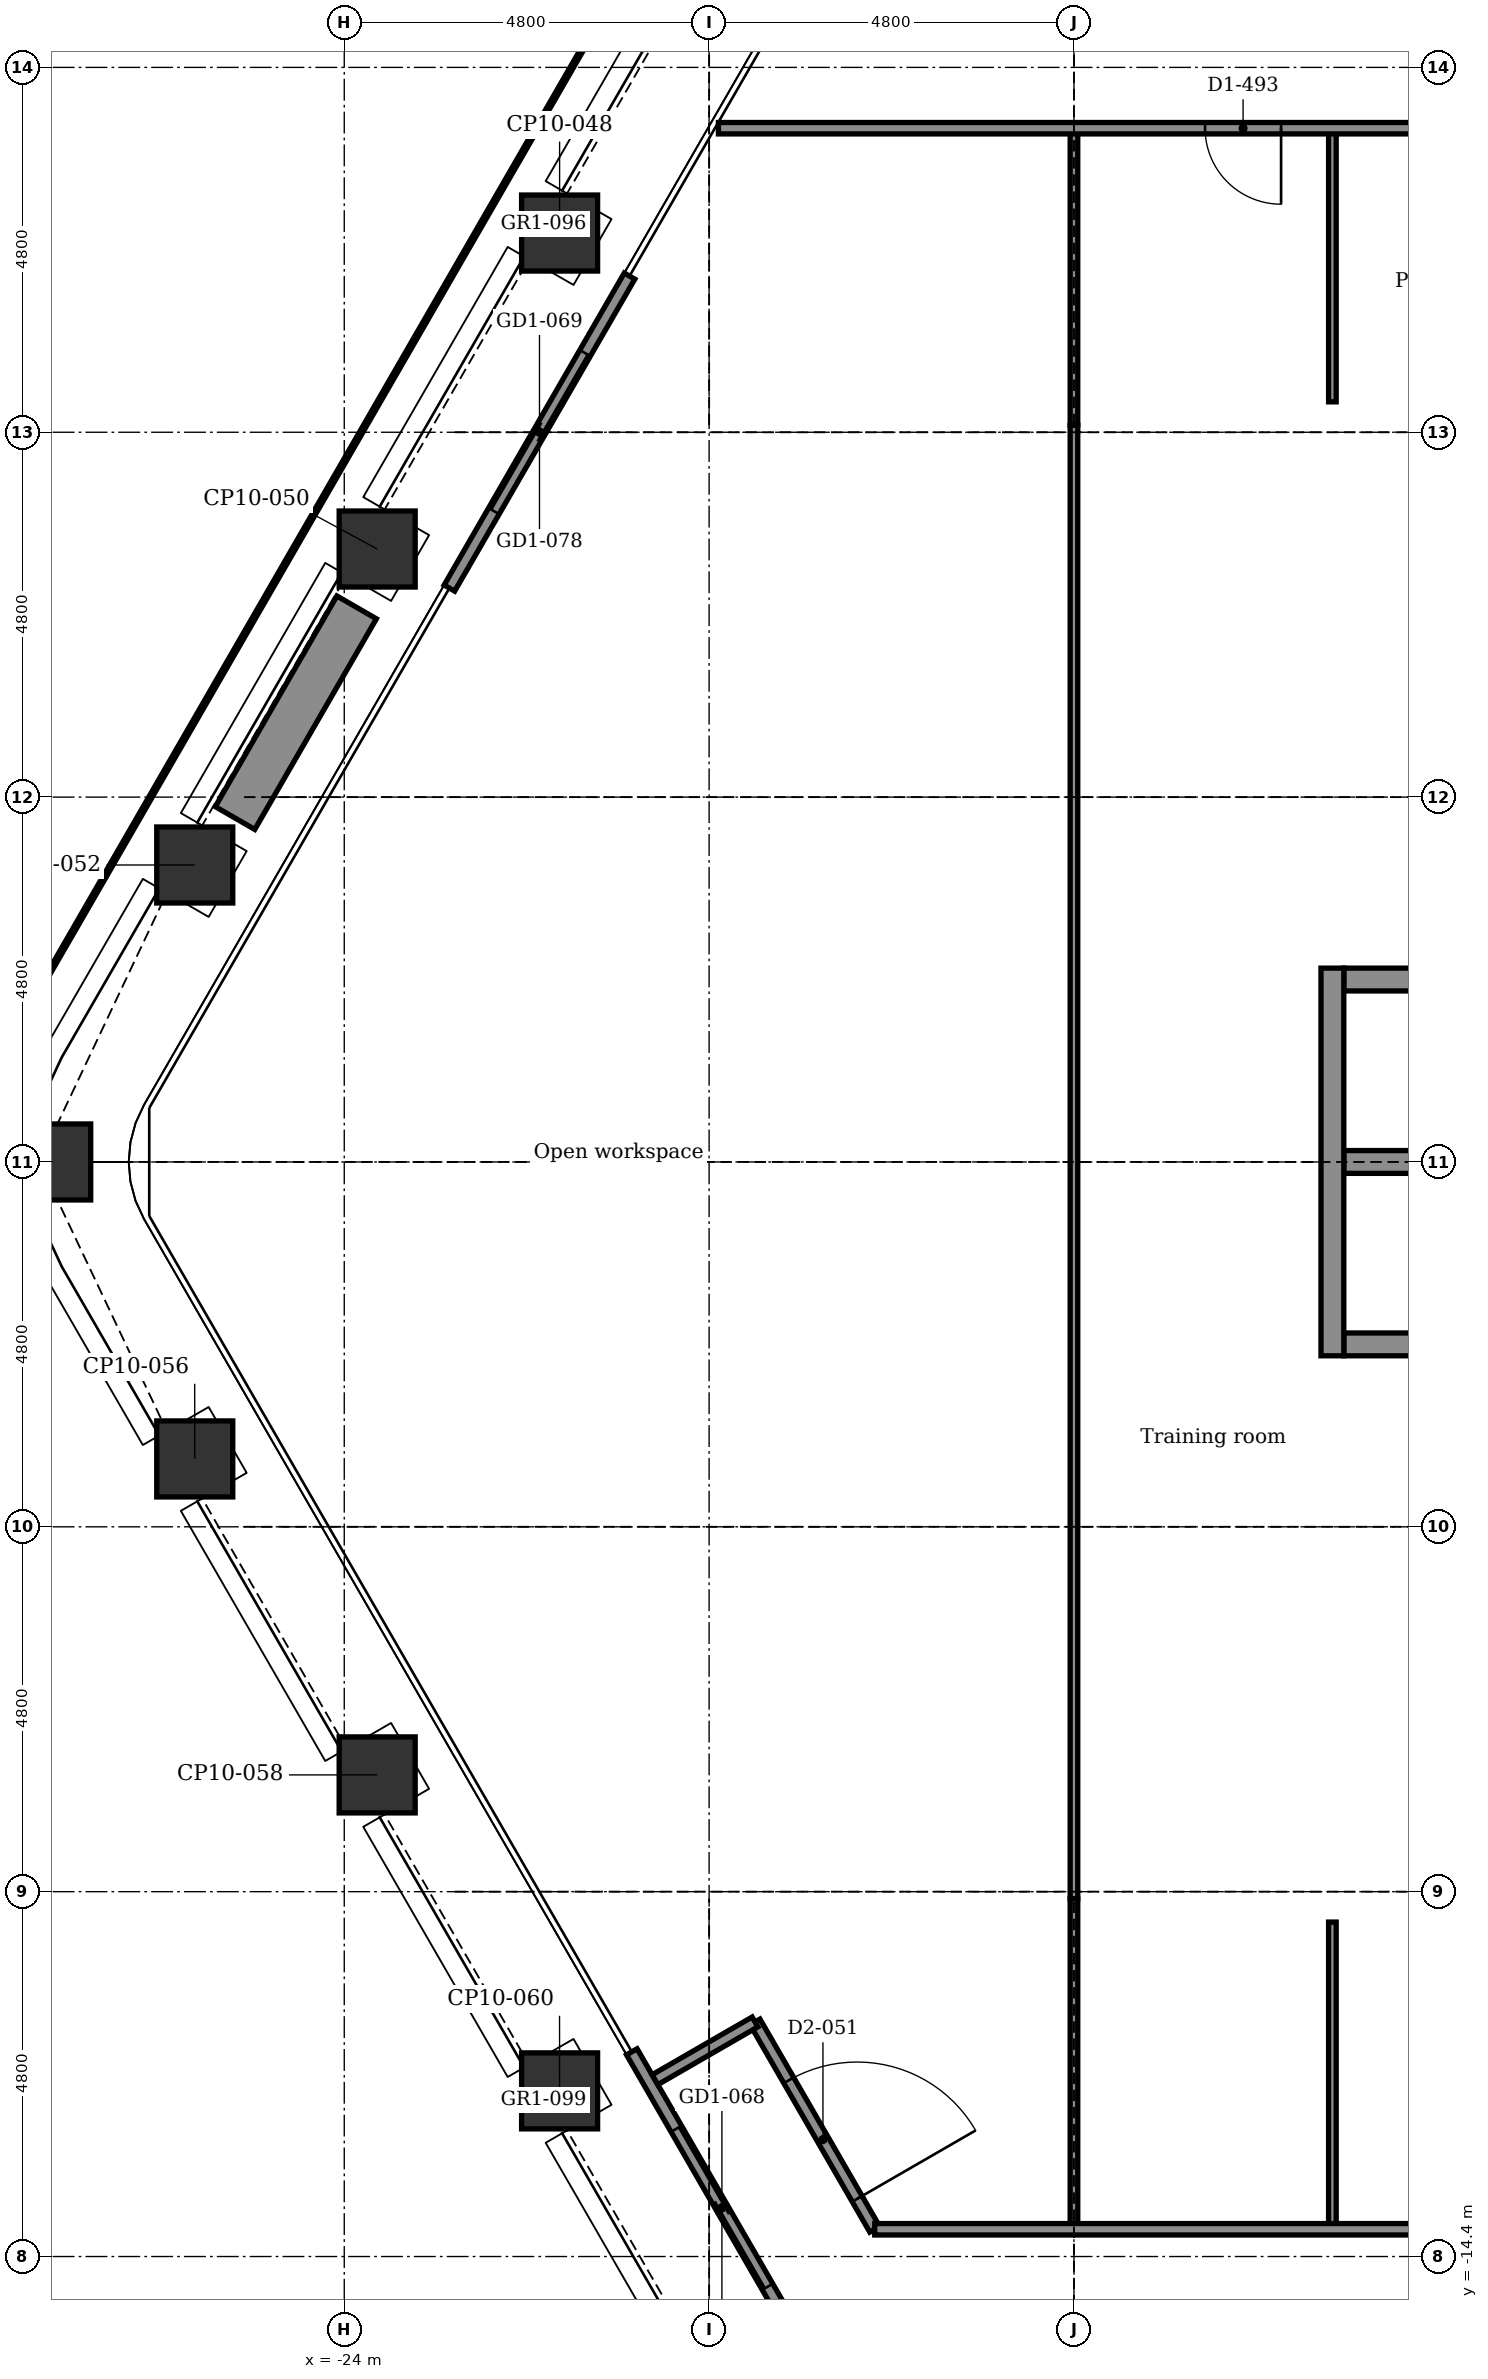
"""IFC4 building model, lengths in metres.
Left out: names, types, materials, properties, quantities, classifications, styles, units other than length and angle.
Written with IfcOpenShell. Run it as: python <this file> out.ifc"""

import sys

from ifc_helpers import new_model, si_unit, direction, frame, frame_2d, origin, origin_2d, place, context, subcontext, project, spatial, rectangle, extrude, element, fill, save


model = new_model("IFC4")
c1 = context("Model", 3, precision=1e-05, world=origin(), true_north=direction((0.0, 1.0)))
c2 = subcontext(c1, "Body", "Model", "MODEL_VIEW")
j1 = project(units=[si_unit("LENGTHUNIT", "METRE"), si_unit("PLANEANGLEUNIT", "RADIAN")], contexts=[c1])
p1 = place(None, origin())
s1 = spatial("IfcSite", under=j1, at=p1, CompositionType="ELEMENT")
p2 = place(p1, origin())
s2 = spatial("IfcBuilding", under=s1, at=p2, CompositionType="ELEMENT")
p3 = place(p2, frame((0.0, 0.0, 170.0)))
s3 = spatial("IfcBuildingStorey", under=s2, at=p3, CompositionType="ELEMENT", Elevation=170.0)
for number, where, z_axis, x_axis in (
    (1, (-21.167, -12.221, -0.15), (0.0, 0.0, 1.0), (0.866, 0.5, 0.0)),
    (2, (-23.567, -8.064, -0.15), (0.0, 0.0, 1.0), (0.866, 0.5, 0.0)),
    (3, (-25.967, -3.907, -0.15), (0.0, 0.0, 1.0), (0.866, 0.5, 0.0)),
    (4, (-27.836, 0.0, -0.15), (0.0, 0.0, 1.0), (1.0, 0.0, 0.0)),
    (5, (-25.967, 3.907, -0.15), (0.0, 0.0, 1.0), (0.5, 0.866, 0.0)),
    (6, (-23.567, 8.064, -0.15), (0.0, 0.0, 1.0), (0.5, 0.866, 0.0)),
    (7, (-21.167, 12.221, -0.15), (0.0, 0.0, 1.0), (0.5, 0.866, 0.0)),
):
    element("IfcColumn", number, at=place(p3, frame(where, z_axis=z_axis, x_axis=x_axis)), inside=s3, PredefinedType="COLUMN", context=c2, shape_type="SweptSolid", body=[
        extrude(rectangle(XDim=1.0, YDim=1.0, at=origin_2d()), origin(), (0.0, 0.0, 1.0), 3.9),
    ])
p4 = place(p3, frame((-10.85, -2.4, -0.15), z_axis=(0.0, 0.0, 1.0), x_axis=(1.0, 0.0, 0.0)))
e8 = element("IfcWall", 8, at=p4, inside=s3, PredefinedType="STANDARD", context=c2, shape_type="SweptSolid", body=[
    extrude(rectangle(XDim=1.1, YDim=0.3, at=frame_2d((0.55, 0.0))), origin(), (0.0, 0.0, 1.0), 3.9),
])
p5 = place(p3, frame((-10.85, 0.0, -0.15), z_axis=(0.0, 0.0, 1.0), x_axis=(1.0, 0.0, 0.0)))
e9 = element("IfcWall", 9, at=p5, inside=s3, PredefinedType="STANDARD", context=c2, shape_type="SweptSolid", body=[
    extrude(rectangle(XDim=3.3, YDim=0.3, at=frame_2d((1.65, 0.0))), origin(), (0.0, 0.0, 1.0), 3.9),
])
p6 = place(p3, frame((-10.85, 2.4, -0.15), z_axis=(0.0, 0.0, 1.0), x_axis=(1.0, 0.0, 0.0)))
e10 = element("IfcWall", 10, at=p6, inside=s3, PredefinedType="STANDARD", context=c2, shape_type="SweptSolid", body=[
    extrude(rectangle(XDim=1.1, YDim=0.3, at=frame_2d((0.55, 0.0))), origin(), (0.0, 0.0, 1.0), 3.9),
])
p7 = place(p3, frame((-11.0, -2.55, -0.15), z_axis=(0.0, 0.0, 1.0), x_axis=(0.0, 1.0, 0.0)))
e11 = element("IfcWall", 11, at=p7, inside=s3, PredefinedType="STANDARD", context=c2, shape_type="SweptSolid", body=[
    extrude(rectangle(XDim=5.1, YDim=0.3, at=frame_2d((2.55, 0.0))), origin(), (0.0, 0.0, 1.0), 3.9),
])
p8 = place(p3, frame((-17.847, -15.812, 0.0), z_axis=(0.0, 0.0, 1.0), x_axis=(-0.5000167099, 0.866015756104, 0.0)))
e12 = element("IfcWall", 12, at=p8, inside=s3, PredefinedType="PARTITIONING", context=c2, shape_type="SweptSolid", body=[
    extrude(rectangle(XDim=4.74, YDim=0.16, at=frame_2d((2.37, 0.0))), origin(), (0.0, 0.0, 1.0), 3.75),
])
p9 = place(p8, frame((1.17, 0.0, 0.0)))
e13 = element("IfcOpeningElement", 13, at=p9, cuts=e12, PredefinedType="OPENING", context=c2, shape_type="SweptSolid", body=[
    extrude(rectangle(XDim=2.4, YDim=2.4, at=frame_2d((1.2, 1.2))), frame((0.0, 0.09, 0.0), z_axis=(0.0, -1.0, 0.0), x_axis=(1.0, 0.0, 0.0)), (0.0, 0.0, 1.0), 0.18),
])
p10 = place(p3, frame((-22.617, 7.55, 0.0), z_axis=(0.0, 0.0, 1.0), x_axis=(0.5000167099, 0.866015756104, 0.0)))
e14 = element("IfcWall", 14, at=p10, inside=s3, PredefinedType="PARTITIONING", context=c2, shape_type="SweptSolid", body=[
    extrude(rectangle(XDim=4.74, YDim=0.16, at=frame_2d((2.37, 0.0))), origin(), (0.0, 0.0, 1.0), 3.75),
])
p11 = place(p10, frame((1.17, 0.0, 0.0)))
e15 = element("IfcOpeningElement", 15, at=p11, cuts=e14, PredefinedType="OPENING", context=c2, shape_type="SweptSolid", body=[
    extrude(rectangle(XDim=2.4, YDim=2.4, at=frame_2d((1.2, 1.2))), frame((0.0, 0.09, 0.0), z_axis=(0.0, -1.0, 0.0), x_axis=(1.0, 0.0, 0.0)), (0.0, 0.0, 1.0), 0.18),
])
p12 = place(p3, frame((-25.437, 4.525, 0.0), z_axis=(0.0, 0.0, 1.0), x_axis=(0.499938187974, 0.866061088033, 0.0)))
e16 = element("IfcWall", 16, at=p12, inside=s3, PredefinedType="USERDEFINED", context=c2, shape_type="SweptSolid", body=[
    extrude(rectangle(XDim=3.2, YDim=0.6, at=frame_2d((1.6, 0.0))), origin(), (0.0, 0.0, 1.0), 0.7),
])
p13 = place(p3, frame((-11.0, -14.042, 0.0), z_axis=(0.0, 0.0, 1.0), x_axis=(0.0, 1.0, 0.0)))
e17 = element("IfcWall", 17, at=p13, inside=s3, PredefinedType="PARTITIONING", context=c2, shape_type="SweptSolid", body=[
    extrude(rectangle(XDim=4.042, YDim=0.1, at=frame_2d((2.021, 0.0))), origin(), (0.0, 0.0, 1.0), 3.75),
])
p14 = place(p3, frame((-11.0, 10.0, 0.0), z_axis=(0.0, 0.0, 1.0), x_axis=(0.0, 1.0, 0.0)))
e18 = element("IfcWall", 18, at=p14, inside=s3, PredefinedType="PARTITIONING", context=c2, shape_type="SweptSolid", body=[
    extrude(rectangle(XDim=3.6, YDim=0.1, at=frame_2d((1.8, 0.0))), origin(), (0.0, 0.0, 1.0), 3.75),
])
p15 = place(p3, frame((-14.4, -9.694, 0.0), z_axis=(0.0, 0.0, 1.0), x_axis=(0.0, 1.0, 0.0)))
e19 = element("IfcWall", 19, at=p15, inside=s3, PredefinedType="PARTITIONING", context=c2, shape_type="SweptSolid", body=[
    extrude(rectangle(XDim=19.387, YDim=0.1, at=frame_2d((9.694, 0.0))), origin(), (0.0, 0.0, 1.0), 3.75),
])
p16 = place(p3, frame((-14.4, -14.042, 0.0), z_axis=(0.0, 0.0, 1.0), x_axis=(0.0, 1.0, 0.0)))
e20 = element("IfcWall", 20, at=p16, inside=s3, PredefinedType="PARTITIONING", context=c2, shape_type="SweptSolid", body=[
    extrude(rectangle(XDim=4.348, YDim=0.1, at=frame_2d((2.174, 0.0))), origin(), (0.0, 0.0, 1.0), 3.066),
])
p17 = place(p3, frame((-14.4, 9.694, 0.0), z_axis=(0.0, 0.0, 1.0), x_axis=(0.0, 1.0, 0.0)))
e21 = element("IfcWall", 21, at=p17, inside=s3, PredefinedType="PARTITIONING", context=c2, shape_type="SweptSolid", body=[
    extrude(rectangle(XDim=3.906, YDim=0.1, at=frame_2d((1.953, 0.0))), origin(), (0.0, 0.0, 1.0), 3.066),
])
p18 = place(p3, frame((-18.596, -11.314, 0.0), z_axis=(0.0, 0.0, 1.0), x_axis=(0.499957296199, -0.866050057432, 0.0)))
e22 = element("IfcWall", 22, at=p18, inside=s3, PredefinedType="PARTITIONING", context=c2, shape_type="SweptSolid", body=[
    extrude(rectangle(XDim=3.15, YDim=0.15, at=frame_2d((1.575, 0.0))), origin(), (0.0, 0.0, 1.0), 3.75),
])
p19 = place(p18, frame((0.887, 0.0, 0.0)))
e23 = element("IfcOpeningElement", 23, at=p19, cuts=e22, PredefinedType="OPENING", context=c2, shape_type="SweptSolid", body=[
    extrude(rectangle(XDim=1.8, YDim=2.1, at=frame_2d((0.9, 1.05))), frame((0.0, 0.085, 0.0), z_axis=(0.0, -1.0, 0.0), x_axis=(1.0, 0.0, 0.0)), (0.0, 0.0, 1.0), 0.17),
])
p20 = place(p3, frame((-19.912, -12.074, 0.0), z_axis=(0.0, 0.0, 1.0), x_axis=(0.866030456496, 0.499991248344, 0.0)))
e24 = element("IfcWall", 24, at=p20, inside=s3, PredefinedType="PARTITIONING", context=c2, shape_type="SweptSolid", body=[
    extrude(rectangle(XDim=1.52, YDim=0.15, at=frame_2d((0.76, 0.0))), origin(), (0.0, 0.0, 1.0), 3.75),
])
p21 = place(p3, frame((-17.021, -14.042, 0.0), z_axis=(0.0, 0.0, 1.0), x_axis=(1.0, 0.0, 0.0)))
e25 = element("IfcWall", 25, at=p21, inside=s3, PredefinedType="PARTITIONING", context=c2, shape_type="SweptSolid", body=[
    extrude(rectangle(XDim=20.621, YDim=0.15, at=frame_2d((10.311, 0.0))), origin(), (0.0, 0.0, 1.0), 3.75),
])
p22 = place(p21, frame((8.671, 0.0, 0.0)))
e26 = element("IfcOpeningElement", 26, at=p22, cuts=e25, PredefinedType="OPENING", context=c2, shape_type="SweptSolid", body=[
    extrude(rectangle(XDim=0.9, YDim=2.1, at=frame_2d((0.45, 1.05))), frame((0.0, 0.085, 0.0), z_axis=(0.0, -1.0, 0.0), x_axis=(1.0, 0.0, 0.0)), (0.0, 0.0, 1.0), 0.17),
])
p23 = place(p21, frame((14.171, 0.0, 0.0)))
e27 = element("IfcOpeningElement", 27, at=p23, cuts=e25, PredefinedType="OPENING", context=c2, shape_type="SweptSolid", body=[
    extrude(rectangle(XDim=0.9, YDim=2.1, at=frame_2d((0.45, 1.05))), frame((0.0, 0.085, 0.0), z_axis=(0.0, -1.0, 0.0), x_axis=(1.0, 0.0, 0.0)), (0.0, 0.0, 1.0), 0.17),
])
p24 = place(p3, frame((-19.077, 13.6, 0.0), z_axis=(0.0, 0.0, 1.0), x_axis=(1.0, 0.0, 0.0)))
e28 = element("IfcWall", 28, at=p24, inside=s3, PredefinedType="PARTITIONING", context=c2, shape_type="SweptSolid", body=[
    extrude(rectangle(XDim=13.677, YDim=0.15, at=frame_2d((6.839, 0.0))), origin(), (0.0, 0.0, 1.0), 3.75),
])
p25 = place(p24, frame((10.377, 0.0, 0.0)))
e29 = element("IfcOpeningElement", 29, at=p25, cuts=e28, PredefinedType="OPENING", context=c2, shape_type="SweptSolid", body=[
    extrude(rectangle(XDim=1.0, YDim=2.1, at=frame_2d((0.5, 1.05))), frame((0.0, 0.085, 0.0), z_axis=(0.0, -1.0, 0.0), x_axis=(1.0, 0.0, 0.0)), (0.0, 0.0, 1.0), 0.17),
])
p26 = place(p24, frame((6.402, 0.0, 0.0)))
e30 = element("IfcOpeningElement", 30, at=p26, cuts=e28, PredefinedType="OPENING", context=c2, shape_type="SweptSolid", body=[
    extrude(rectangle(XDim=1.0, YDim=2.1, at=frame_2d((0.5, 1.05))), frame((0.0, 0.085, 0.0), z_axis=(0.0, -1.0, 0.0), x_axis=(1.0, 0.0, 0.0)), (0.0, 0.0, 1.0), 0.17),
])
p27 = place(p9, origin())
e31 = element("IfcDoor", 31, at=p27, inside=s3, OperationType="DOUBLE_DOOR_SLIDING", PredefinedType="DOOR", context=c2, shape_type="SweptSolid", body=[
    extrude(rectangle(XDim=2.4, YDim=2.4, at=frame_2d((1.2, 1.2))), frame((0.0, 0.025, 0.0), z_axis=(0.0, -1.0, 0.0), x_axis=(1.0, 0.0, 0.0)), (0.0, 0.0, 1.0), 0.05),
])
fill(e13, e31)
p28 = place(p11, origin())
e32 = element("IfcDoor", 32, at=p28, inside=s3, OperationType="DOUBLE_DOOR_SLIDING", PredefinedType="DOOR", context=c2, shape_type="SweptSolid", body=[
    extrude(rectangle(XDim=2.4, YDim=2.4, at=frame_2d((1.2, 1.2))), frame((0.0, 0.025, 0.0), z_axis=(0.0, -1.0, 0.0), x_axis=(1.0, 0.0, 0.0)), (0.0, 0.0, 1.0), 0.05),
])
fill(e15, e32)
p29 = place(p19, origin())
e33 = element("IfcDoor", 33, at=p29, inside=s3, OperationType="SINGLE_SWING_RIGHT", PredefinedType="DOOR", context=c2, shape_type="SweptSolid", body=[
    extrude(rectangle(XDim=1.8, YDim=2.1, at=frame_2d((0.9, 1.05))), frame((0.0, 0.025, 0.0), z_axis=(0.0, -1.0, 0.0), x_axis=(1.0, 0.0, 0.0)), (0.0, 0.0, 1.0), 0.05),
])
fill(e23, e33)
p30 = place(p26, frame((1.0, 0.0, 0.0), z_axis=(0.0, 0.0, 1.0), x_axis=(-1.0, 0.0, 0.0)))
e34 = element("IfcDoor", 34, at=p30, inside=s3, OperationType="SINGLE_SWING_RIGHT", PredefinedType="DOOR", context=c2, shape_type="SweptSolid", body=[
    extrude(rectangle(XDim=1.0, YDim=2.1, at=frame_2d((0.5, 1.05))), frame((0.0, 0.025, 0.0), z_axis=(0.0, -1.0, 0.0), x_axis=(1.0, 0.0, 0.0)), (0.0, 0.0, 1.0), 0.05),
])
fill(e30, e34)
save(model, sys.argv[1])
